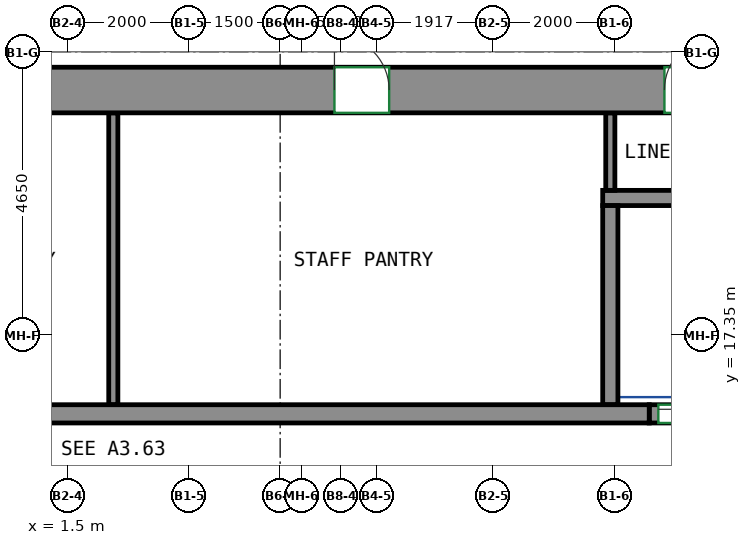
"""IFC4 building model, lengths in metres.
Left out: names, types, materials, properties, quantities, classifications, styles, units other than length and angle.
Written with IfcOpenShell. Run it as: python <this file> out.ifc"""

import sys

from ifc_helpers import new_model, si_unit, direction, frame, frame_2d, origin, place, context, subcontext, project, spatial, rectangle, extrude, source, transform, mapped, element, fill, save


model = new_model("IFC4")
c1 = context("Model", 3, precision=1e-05, world=origin(), true_north=direction((0.0, 1.0)))
c2 = subcontext(c1, "Body", "Model", "MODEL_VIEW")
j1 = project(units=[si_unit("LENGTHUNIT", "METRE"), si_unit("PLANEANGLEUNIT", "RADIAN")], contexts=[c1])
p1 = place(None, origin())
s1 = spatial("IfcSite", under=j1, at=p1, CompositionType="ELEMENT")
p2 = place(p1, origin())
s2 = spatial("IfcBuilding", under=s1, at=p2, CompositionType="ELEMENT")
p3 = place(p2, frame((0.0, 0.0, 256.0)))
s3 = spatial("IfcBuildingStorey", under=s2, at=p3, CompositionType="ELEMENT", Elevation=256.0)
m1 = source(origin(), c2, "Body", "SweptSolid", [
    extrude(rectangle(XDim=33.6, YDim=0.75, at=frame_2d((16.8, 0.0))), origin(), (0.0, 0.0, 1.0), 3.12),
])
p4 = place(p3, frame((-15.75, 21.375, 0.0), z_axis=(0.0, 0.0, 1.0), x_axis=(1.0, 0.0, 0.0)))
e1 = element("IfcWall", 1, at=p4, inside=s3, PredefinedType="SHEAR", context=c2, shape_type="MappedRepresentation", body=[
    mapped(m1, transform((0.0, 0.0, 0.0))),
])
p5 = place(p4, frame((5.858, 0.0, 0.0)))
e2 = element("IfcOpeningElement", 2, at=p5, cuts=e1, PredefinedType="OPENING", context=c2, shape_type="SweptSolid", body=[
    extrude(rectangle(XDim=0.9, YDim=2.1, at=frame_2d((0.45, 1.05))), frame((0.0, 0.385, 0.0), z_axis=(0.0, -1.0, 0.0), x_axis=(1.0, 0.0, 0.0)), (0.0, 0.0, 1.0), 0.77),
])
p6 = place(p4, frame((10.923, 0.0, 0.0)))
e3 = element("IfcOpeningElement", 3, at=p6, cuts=e1, PredefinedType="OPENING", context=c2, shape_type="SweptSolid", body=[
    extrude(rectangle(XDim=0.9, YDim=2.1, at=frame_2d((0.45, 1.05))), frame((0.0, 0.385, 0.0), z_axis=(0.0, -1.0, 0.0), x_axis=(1.0, 0.0, 0.0)), (0.0, 0.0, 1.0), 0.77),
])
p7 = place(p4, frame((15.988, 0.0, 0.0)))
e4 = element("IfcOpeningElement", 4, at=p7, cuts=e1, PredefinedType="OPENING", context=c2, shape_type="SweptSolid", body=[
    extrude(rectangle(XDim=0.9, YDim=2.1, at=frame_2d((0.45, 1.05))), frame((0.0, 0.385, 0.0), z_axis=(0.0, -1.0, 0.0), x_axis=(1.0, 0.0, 0.0)), (0.0, 0.0, 1.0), 0.77),
])
p8 = place(p4, frame((21.643, 0.0, 0.0)))
e5 = element("IfcOpeningElement", 5, at=p8, cuts=e1, PredefinedType="OPENING", context=c2, shape_type="SweptSolid", body=[
    extrude(rectangle(XDim=0.9, YDim=2.1, at=frame_2d((0.45, 1.05))), frame((0.0, 0.385, 0.0), z_axis=(0.0, -1.0, 0.0), x_axis=(1.0, 0.0, 0.0)), (0.0, 0.0, 1.0), 0.77),
])
p9 = place(p4, frame((27.07, 0.0, 0.0)))
e6 = element("IfcOpeningElement", 6, at=p9, cuts=e1, PredefinedType="OPENING", context=c2, shape_type="SweptSolid", body=[
    extrude(rectangle(XDim=0.9, YDim=2.1, at=frame_2d((0.45, 1.05))), frame((0.0, 0.385, 0.0), z_axis=(0.0, -1.0, 0.0), x_axis=(1.0, 0.0, 0.0)), (0.0, 0.0, 1.0), 0.77),
])
p10 = place(p4, frame((2.275, 0.0, 0.0)))
e7 = element("IfcOpeningElement", 7, at=p10, cuts=e1, PredefinedType="OPENING", context=c2, shape_type="SweptSolid", body=[
    extrude(rectangle(XDim=0.9, YDim=2.1, at=frame_2d((0.45, 1.05))), frame((0.0, 0.385, 0.0), z_axis=(0.0, -1.0, 0.0), x_axis=(1.0, 0.0, 0.0)), (0.0, 0.0, 1.0), 0.77),
])
p11 = place(p4, frame((30.425, 0.0, 0.0)))
e8 = element("IfcOpeningElement", 8, at=p11, cuts=e1, PredefinedType="OPENING", context=c2, shape_type="SweptSolid", body=[
    extrude(rectangle(XDim=0.9, YDim=2.1, at=frame_2d((0.45, 1.05))), frame((0.0, 0.385, 0.0), z_axis=(0.0, -1.0, 0.0), x_axis=(1.0, 0.0, 0.0)), (0.0, 0.0, 1.0), 0.77),
])
m2 = source(origin(), c2, "Body", "SweptSolid", [
    extrude(rectangle(XDim=22.08, YDim=0.3, at=frame_2d((11.04, 0.0))), origin(), (0.0, 0.0, 1.0), 3.12),
])
p12 = place(p3, frame((-11.01, 16.05, 0.0), z_axis=(0.0, 0.0, 1.0), x_axis=(1.0, 0.0, 0.0)))
e9 = element("IfcWall", 9, at=p12, inside=s3, PredefinedType="SHEAR", context=c2, shape_type="MappedRepresentation", body=[
    mapped(m2, transform((0.0, 0.0, 0.0))),
])
m3 = source(origin(), c2, "Body", "SweptSolid", [
    extrude(rectangle(XDim=1.4, YDim=0.3, at=frame_2d((0.7, 0.0))), origin(), (0.0, 0.0, 1.0), 3.12),
])
p13 = place(p3, frame((11.07, 16.05, 0.0), z_axis=(0.0, 0.0, 1.0), x_axis=(1.0, 0.0, 0.0)))
e10 = element("IfcWall", 10, at=p13, inside=s3, PredefinedType="PARTITIONING", context=c2, shape_type="MappedRepresentation", body=[
    mapped(m3, transform((0.0, 0.0, 0.0))),
])
p14 = place(p13, frame((0.15, 0.0, 0.0)))
e11 = element("IfcOpeningElement", 11, at=p14, cuts=e10, PredefinedType="OPENING", context=c2, shape_type="SweptSolid", body=[
    extrude(rectangle(XDim=1.1, YDim=2.1, at=frame_2d((0.55, 1.05))), frame((0.0, 0.16, 0.0), z_axis=(0.0, -1.0, 0.0), x_axis=(1.0, 0.0, 0.0)), (0.0, 0.0, 1.0), 0.32),
])
m4 = source(origin(), c2, "Body", "SweptSolid", [
    extrude(rectangle(XDim=2.93, YDim=0.25, at=frame_2d((1.465, 0.0))), origin(), (0.0, 0.0, 1.0), 3.12),
])
p15 = place(p3, frame((10.305, 19.6, 0.0), z_axis=(0.0, 0.0, 1.0), x_axis=(1.0, 0.0, 0.0)))
e12 = element("IfcWall", 12, at=p15, inside=s3, PredefinedType="PARTITIONING", context=c2, shape_type="MappedRepresentation", body=[
    mapped(m4, transform((0.0, 0.0, 0.0))),
])
m5 = source(origin(), c2, "Body", "SweptSolid", [
    extrude(rectangle(XDim=3.275, YDim=0.25, at=frame_2d((1.638, 0.0))), origin(), (0.0, 0.0, 1.0), 3.12),
])
p16 = place(p3, frame((10.43, 16.2, 0.0), z_axis=(0.0, 0.0, 1.0), x_axis=(0.0, 1.0, 0.0)))
e13 = element("IfcWall", 13, at=p16, inside=s3, PredefinedType="PARTITIONING", context=c2, shape_type="MappedRepresentation", body=[
    mapped(m5, transform((0.0, 0.0, 0.0))),
])
m6 = source(origin(), c2, "Body", "SweptSolid", [
    extrude(rectangle(XDim=4.8, YDim=0.15, at=frame_2d((2.4, 0.0))), origin(), (0.0, 0.0, 1.0), 3.12),
])
p17 = place(p3, frame((2.256, 16.2, 0.0), z_axis=(0.0, 0.0, 1.0), x_axis=(0.0, 1.0, 0.0)))
e14 = element("IfcWall", 14, at=p17, inside=s3, PredefinedType="PARTITIONING", context=c2, shape_type="MappedRepresentation", body=[
    mapped(m6, transform((0.0, 0.0, 0.0))),
])
m7 = source(origin(), c2, "Body", "SweptSolid", [
    extrude(rectangle(XDim=1.275, YDim=0.15, at=frame_2d((0.637, 0.0))), origin(), (0.0, 0.0, 1.0), 3.12),
])
p18 = place(p3, frame((10.43, 19.725, 0.0), z_axis=(0.0, 0.0, 1.0), x_axis=(0.0, 1.0, 0.0)))
e15 = element("IfcWall", 15, at=p18, inside=s3, PredefinedType="PARTITIONING", context=c2, shape_type="MappedRepresentation", body=[
    mapped(m7, transform((0.0, 0.0, 0.0))),
])
p19 = place(p14, origin())
e16 = element("IfcDoor", 16, at=p19, inside=s3, OperationType="DOUBLE_DOOR_SLIDING", PredefinedType="DOOR", context=c2, shape_type="SweptSolid", body=[
    extrude(rectangle(XDim=1.1, YDim=2.1, at=frame_2d((0.55, 1.05))), frame((0.0, 0.025, 0.0), z_axis=(0.0, -1.0, 0.0), x_axis=(1.0, 0.0, 0.0)), (0.0, 0.0, 1.0), 0.05),
])
fill(e11, e16)
p20 = place(p8, origin())
e17 = element("IfcDoor", 17, at=p20, inside=s3, OperationType="SINGLE_SWING_LEFT", PredefinedType="DOOR", context=c2, shape_type="SweptSolid", body=[
    extrude(rectangle(XDim=0.9, YDim=2.1, at=frame_2d((0.45, 1.05))), frame((0.0, -0.23, 0.0), z_axis=(0.0, -1.0, 0.0), x_axis=(1.0, 0.0, 0.0)), (0.0, 0.0, 1.0), 0.05),
])
fill(e5, e17)
p21 = place(p9, origin())
e18 = element("IfcDoor", 18, at=p21, inside=s3, OperationType="SINGLE_SWING_RIGHT", PredefinedType="DOOR", context=c2, shape_type="SweptSolid", body=[
    extrude(rectangle(XDim=0.9, YDim=2.1, at=frame_2d((0.45, 1.05))), frame((0.0, -0.23, 0.0), z_axis=(0.0, -1.0, 0.0), x_axis=(1.0, 0.0, 0.0)), (0.0, 0.0, 1.0), 0.05),
])
fill(e6, e18)
save(model, sys.argv[1])
